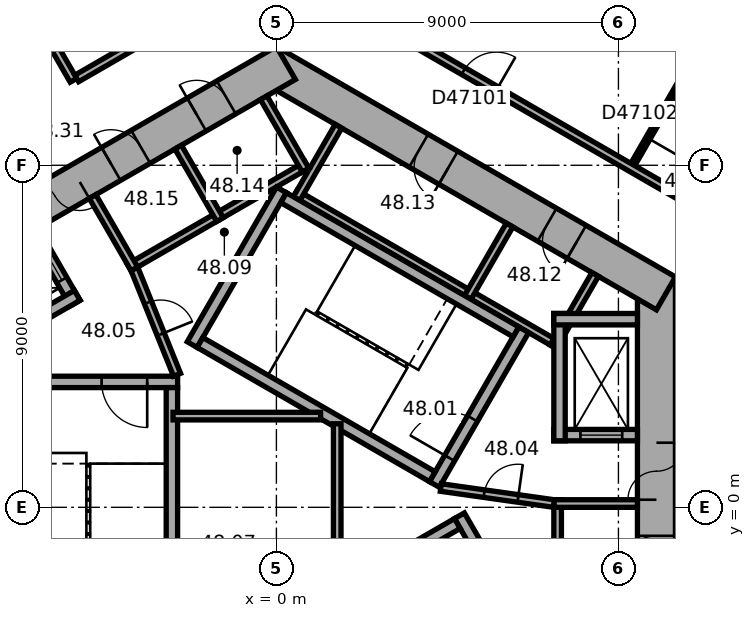
"""IFC4 building model, lengths in metres.
Left out: names, types, materials, properties, quantities, classifications, styles, units other than length and angle.
Written with IfcOpenShell. Run it as: python <this file> out.ifc"""

import sys

from ifc_helpers import new_model, si_unit, direction, frame, frame_2d, origin, place, context, subcontext, project, spatial, rectangle, extrude, element, fill, save


model = new_model("IFC4")
c1 = context("Model", 3, precision=1e-05, world=origin(), true_north=direction((0.0, 1.0)))
c2 = subcontext(c1, "Body", "Model", "MODEL_VIEW")
j1 = project(units=[si_unit("LENGTHUNIT", "METRE"), si_unit("PLANEANGLEUNIT", "RADIAN")], contexts=[c1])
p1 = place(None, origin())
s1 = spatial("IfcSite", under=j1, at=p1, CompositionType="ELEMENT")
p2 = place(p1, origin())
s2 = spatial("IfcBuilding", under=s1, at=p2, CompositionType="ELEMENT")
p3 = place(p2, frame((0.0, 0.0, 194.7)))
s3 = spatial("IfcBuildingStorey", under=s2, at=p3, CompositionType="ELEMENT", Elevation=194.7)
p4 = place(p3, frame((10.0, -6.062, 0.0), z_axis=(0.0, 0.0, 1.0), x_axis=(0.0, 1.0, 0.0)))
e1 = element("IfcWall", 1, at=p4, inside=s3, PredefinedType="SHEAR", context=c2, shape_type="SweptSolid", body=[
    extrude(rectangle(XDim=12.125, YDim=1.0, at=frame_2d((6.062, 0.0))), origin(), (0.0, 0.0, 1.0), 3.7),
])
p5 = place(p4, frame((6.262, 0.0, 0.0)))
e2 = element("IfcOpeningElement", 2, at=p5, cuts=e1, PredefinedType="OPENING", context=c2, shape_type="SweptSolid", body=[
    extrude(rectangle(XDim=1.5, YDim=2.1, at=frame_2d((0.75, 1.05))), frame((0.0, 0.51, 0.0), z_axis=(0.0, -1.0, 0.0), x_axis=(1.0, 0.0, 0.0)), (0.0, 0.0, 1.0), 1.02),
])
p6 = place(p4, frame((1.812, 0.0, 0.0)))
e3 = element("IfcOpeningElement", 3, at=p6, cuts=e1, PredefinedType="OPENING", context=c2, shape_type="SweptSolid", body=[
    extrude(rectangle(XDim=0.9, YDim=2.1, at=frame_2d((0.45, 1.05))), frame((0.0, 0.51, 0.0), z_axis=(0.0, -1.0, 0.0), x_axis=(1.0, 0.0, 0.0)), (0.0, 0.0, 1.0), 1.02),
])
p7 = place(p4, frame((4.412, 0.0, 0.0)))
e4 = element("IfcOpeningElement", 4, at=p7, cuts=e1, PredefinedType="OPENING", context=c2, shape_type="SweptSolid", body=[
    extrude(rectangle(XDim=0.9, YDim=2.1, at=frame_2d((0.45, 1.05))), frame((0.0, 0.51, 0.0), z_axis=(0.0, -1.0, 0.0), x_axis=(1.0, 0.0, 0.0)), (0.0, 0.0, 1.0), 1.02),
])
p8 = place(p3, frame((10.25, 5.629, 0.0), z_axis=(0.0, 0.0, 1.0), x_axis=(-0.866022616891, 0.50000482701, 0.0)))
e5 = element("IfcWall", 5, at=p8, inside=s3, PredefinedType="SHEAR", context=c2, shape_type="SweptSolid", body=[
    extrude(rectangle(XDim=12.125, YDim=1.0, at=frame_2d((6.062, 0.0))), origin(), (0.0, 0.0, 1.0), 3.7),
])
p9 = place(p8, frame((2.712, 0.0, 0.0)))
e6 = element("IfcOpeningElement", 6, at=p9, cuts=e5, PredefinedType="OPENING", context=c2, shape_type="SweptSolid", body=[
    extrude(rectangle(XDim=0.9, YDim=2.1, at=frame_2d((0.45, 1.05))), frame((0.0, 0.51, 0.0), z_axis=(0.0, -1.0, 0.0), x_axis=(1.0, 0.0, 0.0)), (0.0, 0.0, 1.0), 1.02),
])
p10 = place(p8, frame((6.612, 0.0, 0.0)))
e7 = element("IfcOpeningElement", 7, at=p10, cuts=e5, PredefinedType="OPENING", context=c2, shape_type="SweptSolid", body=[
    extrude(rectangle(XDim=0.9, YDim=2.1, at=frame_2d((0.45, 1.05))), frame((0.0, 0.51, 0.0), z_axis=(0.0, -1.0, 0.0), x_axis=(1.0, 0.0, 0.0)), (0.0, 0.0, 1.0), 1.02),
])
p11 = place(p3, frame((0.25, 11.691, 0.0), z_axis=(0.0, 0.0, 1.0), x_axis=(-0.866022616891, -0.50000482701, 0.0)))
e8 = element("IfcWall", 8, at=p11, inside=s3, PredefinedType="SHEAR", context=c2, shape_type="SweptSolid", body=[
    extrude(rectangle(XDim=12.125, YDim=1.0, at=frame_2d((6.062, 0.0))), origin(), (0.0, 0.0, 1.0), 3.7),
])
p12 = place(p11, frame((6.262, 0.0, 0.0)))
e9 = element("IfcOpeningElement", 9, at=p12, cuts=e8, PredefinedType="OPENING", context=c2, shape_type="SweptSolid", body=[
    extrude(rectangle(XDim=1.5, YDim=2.1, at=frame_2d((0.75, 1.05))), frame((0.0, 0.51, 0.0), z_axis=(0.0, -1.0, 0.0), x_axis=(1.0, 0.0, 0.0)), (0.0, 0.0, 1.0), 1.02),
])
p13 = place(p11, frame((1.812, 0.0, 0.0)))
e10 = element("IfcOpeningElement", 10, at=p13, cuts=e8, PredefinedType="OPENING", context=c2, shape_type="SweptSolid", body=[
    extrude(rectangle(XDim=0.9, YDim=2.1, at=frame_2d((0.45, 1.05))), frame((0.0, 0.51, 0.0), z_axis=(0.0, -1.0, 0.0), x_axis=(1.0, 0.0, 0.0)), (0.0, 0.0, 1.0), 1.02),
])
p14 = place(p11, frame((4.412, 0.0, 0.0)))
e11 = element("IfcOpeningElement", 11, at=p14, cuts=e8, PredefinedType="OPENING", context=c2, shape_type="SweptSolid", body=[
    extrude(rectangle(XDim=0.9, YDim=2.1, at=frame_2d((0.45, 1.05))), frame((0.0, 0.51, 0.0), z_axis=(0.0, -1.0, 0.0), x_axis=(1.0, 0.0, 0.0)), (0.0, 0.0, 1.0), 1.02),
])
p15 = place(p3, frame((7.4, -5.2, 0.0), z_axis=(0.0, 0.0, 1.0), x_axis=(0.0, 1.0, 0.0)))
e12 = element("IfcWall", 12, at=p15, inside=s3, PredefinedType="PARTITIONING", context=c2, shape_type="SweptSolid", body=[
    extrude(rectangle(XDim=5.4, YDim=0.2, at=frame_2d((2.7, 0.0))), origin(), (0.0, 0.0, 1.0), 3.42),
])
p16 = place(p3, frame((7.3, 0.1, 0.0), z_axis=(0.0, 0.0, 1.0), x_axis=(1.0, 0.0, 0.0)))
e13 = element("IfcWall", 13, at=p16, inside=s3, PredefinedType="PARTITIONING", context=c2, shape_type="SweptSolid", body=[
    extrude(rectangle(XDim=2.2, YDim=0.2, at=frame_2d((1.1, 0.0))), origin(), (0.0, 0.0, 1.0), 3.42),
])
p17 = place(p3, frame((7.424, 4.259, 0.0), z_axis=(0.0, 0.0, 1.0), x_axis=(-0.866026010844, 0.49999894854, 0.0)))
e14 = element("IfcWall", 14, at=p17, inside=s3, PredefinedType="PARTITIONING", context=c2, shape_type="SweptSolid", body=[
    extrude(rectangle(XDim=8.0, YDim=0.2, at=frame_2d((4.0, 0.0))), origin(), (0.0, 0.0, 1.0), 3.42),
])
for number, where, z_axis, x_axis in (
    (15, (7.287, 4.222, 0.0), (0.0, 0.0, 1.0), (0.5, 0.866, 0.0)),
    (16, (5.036, 5.522, 0.0), (0.0, 0.0, 1.0), (0.5, 0.866, 0.0)),
    (17, (0.532, 8.122, 0.0), (0.0, 0.0, 1.0), (0.5, 0.866, 0.0)),
):
    element("IfcWall", number, at=place(p3, frame(where, z_axis=z_axis, x_axis=x_axis)), inside=s3, PredefinedType="PARTITIONING", context=c2, shape_type="SweptSolid", body=[
        extrude(rectangle(XDim=2.2, YDim=0.2, at=frame_2d((1.1, 0.0))), origin(), (0.0, 0.0, 1.0), 3.42),
    ])
p18 = place(p3, frame((0.803, 9.009, 0.0), z_axis=(0.0, 0.0, 1.0), x_axis=(-0.866028230842, -0.499995103361, 0.0)))
e18 = element("IfcWall", 18, at=p18, inside=s3, PredefinedType="PARTITIONING", context=c2, shape_type="SweptSolid", body=[
    extrude(rectangle(XDim=5.4, YDim=0.2, at=frame_2d((2.7, 0.0))), origin(), (0.0, 0.0, 1.0), 3.42),
])
p19 = place(p3, frame((0.767, 8.872, 0.0), z_axis=(0.0, 0.0, 1.0), x_axis=(-0.499994660107, 0.866028486751, 0.0)))
e19 = element("IfcWall", 19, at=p19, inside=s3, PredefinedType="PARTITIONING", context=c2, shape_type="SweptSolid", body=[
    extrude(rectangle(XDim=2.2, YDim=0.2, at=frame_2d((1.1, 0.0))), origin(), (0.0, 0.0, 1.0), 3.42),
])
for number, where, z_axis, x_axis in (
    (20, (-1.485, 7.572, 0.0), (0.0, 0.0, 1.0), (-0.5, 0.866, 0.0)),
    (21, (-3.737, 6.272, 0.0), (0.0, 0.0, 1.0), (-0.5, 0.866, 0.0)),
):
    element("IfcWall", number, at=place(p3, frame(where, z_axis=z_axis, x_axis=x_axis)), inside=s3, PredefinedType="PARTITIONING", context=c2, shape_type="SweptSolid", body=[
        extrude(rectangle(XDim=2.2, YDim=0.2, at=frame_2d((1.1, 0.0))), origin(), (0.0, 0.0, 1.0), 3.42),
    ])
p20 = place(p3, frame((4.158, 0.602, 0.0), z_axis=(0.0, 0.0, 1.0), x_axis=(0.499977259774, 0.866038532462, 0.0)))
e22 = element("IfcWall", 22, at=p20, inside=s3, PredefinedType="SHEAR", context=c2, shape_type="SweptSolid", body=[
    extrude(rectangle(XDim=4.7, YDim=0.3, at=frame_2d((2.35, 0.0))), origin(), (0.0, 0.0, 1.0), 3.42),
])
p21 = place(p20, frame((0.8, 0.0, 0.0)))
e23 = element("IfcOpeningElement", 23, at=p21, cuts=e22, PredefinedType="OPENING", context=c2, shape_type="SweptSolid", body=[
    extrude(rectangle(XDim=1.2, YDim=2.1, at=frame_2d((0.6, 1.05))), frame((0.0, 0.16, 0.0), z_axis=(0.0, -1.0, 0.0), x_axis=(1.0, 0.0, 0.0)), (0.0, 0.0, 1.0), 0.32),
])
p22 = place(p3, frame((-2.216, 4.282, 0.0), z_axis=(0.0, 0.0, 1.0), x_axis=(0.499977259774, 0.866038532462, 0.0)))
e24 = element("IfcWall", 24, at=p22, inside=s3, PredefinedType="SHEAR", context=c2, shape_type="SweptSolid", body=[
    extrude(rectangle(XDim=4.7, YDim=0.3, at=frame_2d((2.35, 0.0))), origin(), (0.0, 0.0, 1.0), 3.42),
])
for number, where, z_axis, x_axis in (
    (25, (4.103, 0.807, 0.0), (0.0, 0.0, 1.0), (-0.866, 0.5, 0.0)),
    (26, (6.303, 4.617, 0.0), (0.0, 0.0, 1.0), (-0.866, 0.5, 0.0)),
):
    element("IfcWall", number, at=place(p3, frame(where, z_axis=z_axis, x_axis=x_axis)), inside=s3, PredefinedType="SHEAR", context=c2, shape_type="SweptSolid", body=[
        extrude(rectangle(XDim=7.06, YDim=0.3, at=frame_2d((3.53, 0.0))), origin(), (0.0, 0.0, 1.0), 3.42),
    ])
p23 = place(p3, frame((-2.6, 3.3, 0.0), z_axis=(0.0, 0.0, 1.0), x_axis=(-1.0, 0.0, 0.0)))
e27 = element("IfcWall", 27, at=p23, inside=s3, PredefinedType="SHEAR", context=c2, shape_type="SweptSolid", body=[
    extrude(rectangle(XDim=4.7, YDim=0.3, at=frame_2d((2.35, 0.0))), origin(), (0.0, 0.0, 1.0), 3.42),
])
p24 = place(p23, frame((0.8, 0.0, 0.0)))
e28 = element("IfcOpeningElement", 28, at=p24, cuts=e27, PredefinedType="OPENING", context=c2, shape_type="SweptSolid", body=[
    extrude(rectangle(XDim=1.2, YDim=2.1, at=frame_2d((0.6, 1.05))), frame((0.0, 0.16, 0.0), z_axis=(0.0, -1.0, 0.0), x_axis=(1.0, 0.0, 0.0)), (0.0, 0.0, 1.0), 0.32),
])
p25 = place(p3, frame((-2.75, 3.15, 0.0), z_axis=(0.0, 0.0, 1.0), x_axis=(0.0, -1.0, 0.0)))
e29 = element("IfcWall", 29, at=p25, inside=s3, PredefinedType="SHEAR", context=c2, shape_type="SweptSolid", body=[
    extrude(rectangle(XDim=7.06, YDim=0.3, at=frame_2d((3.53, 0.0))), origin(), (0.0, 0.0, 1.0), 3.42),
])
p26 = place(p3, frame((4.816, -0.222, 0.0), z_axis=(0.0, 0.0, 1.0), x_axis=(0.499977259774, -0.866038532462, 0.0)))
e30 = element("IfcWall", 30, at=p26, inside=s3, PredefinedType="SHEAR", context=c2, shape_type="SweptSolid", body=[
    extrude(rectangle(XDim=4.7, YDim=0.3, at=frame_2d((2.35, 0.0))), origin(), (0.0, 0.0, 1.0), 3.42),
])
p27 = place(p3, frame((-1.353, -3.957, 0.0), z_axis=(0.0, 0.0, 1.0), x_axis=(0.866027801685, 0.499995846692, 0.0)))
e31 = element("IfcWall", 31, at=p27, inside=s3, PredefinedType="SHEAR", context=c2, shape_type="SweptSolid", body=[
    extrude(rectangle(XDim=7.06, YDim=0.3, at=frame_2d((3.53, 0.0))), origin(), (0.0, 0.0, 1.0), 3.42),
])
p28 = place(p3, frame((7.3, 1.9, 0.0), z_axis=(0.0, 0.0, 1.0), x_axis=(1.0, 0.0, 0.0)))
e32 = element("IfcWall", 32, at=p28, inside=s3, PredefinedType="SHEAR", context=c2, shape_type="SweptSolid", body=[
    extrude(rectangle(XDim=2.2, YDim=0.3, at=frame_2d((1.1, 0.0))), origin(), (0.0, 0.0, 1.0), 3.42),
])
p29 = place(p28, frame((0.7, 0.0, 0.0)))
e33 = element("IfcOpeningElement", 33, at=p29, cuts=e32, PredefinedType="OPENING", context=c2, shape_type="SweptSolid", body=[
    extrude(rectangle(XDim=1.1, YDim=2.1, at=frame_2d((0.55, 1.05))), frame((0.0, 0.16, 0.0), z_axis=(0.0, -1.0, 0.0), x_axis=(1.0, 0.0, 0.0)), (0.0, 0.0, 1.0), 0.32),
])
p30 = place(p3, frame((7.45, 1.75, 0.0), z_axis=(0.0, 0.0, 1.0), x_axis=(0.0, 1.0, 0.0)))
e34 = element("IfcWall", 34, at=p30, inside=s3, PredefinedType="SHEAR", context=c2, shape_type="SweptSolid", body=[
    extrude(rectangle(XDim=3.35, YDim=0.3, at=frame_2d((1.675, 0.0))), origin(), (0.0, 0.0, 1.0), 3.42),
])
p31 = place(p3, frame((7.3, 4.95, 0.0), z_axis=(0.0, 0.0, 1.0), x_axis=(1.0, 0.0, 0.0)))
e35 = element("IfcWall", 35, at=p31, inside=s3, PredefinedType="SHEAR", context=c2, shape_type="SweptSolid", body=[
    extrude(rectangle(XDim=2.2, YDim=0.3, at=frame_2d((1.1, 0.0))), origin(), (0.0, 0.0, 1.0), 3.42),
])
p32 = place(p3, frame((4.327, 0.521, 0.0), z_axis=(0.0, 0.0, 1.0), x_axis=(0.990124376366, -0.14019172346, 0.0)))
e36 = element("IfcWall", 36, at=p32, inside=s3, PredefinedType="PARTITIONING", context=c2, shape_type="SweptSolid", body=[
    extrude(rectangle(XDim=3.002, YDim=0.2, at=frame_2d((1.501, 0.0))), origin(), (0.0, 0.0, 1.0), 3.42),
])
p33 = place(p32, frame((1.15, 0.0, 0.0)))
e37 = element("IfcOpeningElement", 37, at=p33, cuts=e36, PredefinedType="OPENING", context=c2, shape_type="SweptSolid", body=[
    extrude(rectangle(XDim=0.9, YDim=2.1, at=frame_2d((0.45, 1.05))), frame((0.0, 0.11, 0.0), z_axis=(0.0, -1.0, 0.0), x_axis=(1.0, 0.0, 0.0)), (0.0, 0.0, 1.0), 0.22),
])
p34 = place(p3, frame((-5.295, 5.372, 0.0), z_axis=(0.0, 0.0, 1.0), x_axis=(-0.500077893725, 0.86598042715, 0.0)))
e38 = element("IfcWall", 38, at=p34, inside=s3, PredefinedType="SHEAR", context=c2, shape_type="SweptSolid", body=[
    extrude(rectangle(XDim=2.2, YDim=0.3, at=frame_2d((1.1, 0.0))), origin(), (0.0, 0.0, 1.0), 3.42),
])
p35 = place(p34, frame((0.7, 0.0, 0.0)))
e39 = element("IfcOpeningElement", 39, at=p35, cuts=e38, PredefinedType="OPENING", context=c2, shape_type="SweptSolid", body=[
    extrude(rectangle(XDim=1.1, YDim=2.1, at=frame_2d((0.55, 1.05))), frame((0.0, 0.16, 0.0), z_axis=(0.0, -1.0, 0.0), x_axis=(1.0, 0.0, 0.0)), (0.0, 0.0, 1.0), 0.32),
])
p36 = place(p3, frame((-5.24, 5.577, 0.0), z_axis=(0.0, 0.0, 1.0), x_axis=(-0.866014461049, -0.500018952895, 0.0)))
e40 = element("IfcWall", 40, at=p36, inside=s3, PredefinedType="SHEAR", context=c2, shape_type="SweptSolid", body=[
    extrude(rectangle(XDim=3.35, YDim=0.3, at=frame_2d((1.675, 0.0))), origin(), (0.0, 0.0, 1.0), 3.42),
])
p37 = place(p3, frame((-2.615, 3.487, 0.0), z_axis=(0.0, 0.0, 1.0), x_axis=(-0.373576831041, 0.92759924068, 0.0)))
e41 = element("IfcWall", 41, at=p37, inside=s3, PredefinedType="PARTITIONING", context=c2, shape_type="SweptSolid", body=[
    extrude(rectangle(XDim=3.002, YDim=0.2, at=frame_2d((1.501, 0.0))), origin(), (0.0, 0.0, 1.0), 3.42),
])
p38 = place(p37, frame((1.15, 0.0, 0.0)))
e42 = element("IfcOpeningElement", 42, at=p38, cuts=e41, PredefinedType="OPENING", context=c2, shape_type="SweptSolid", body=[
    extrude(rectangle(XDim=0.9, YDim=2.1, at=frame_2d((0.45, 1.05))), frame((0.0, 0.11, 0.0), z_axis=(0.0, -1.0, 0.0), x_axis=(1.0, 0.0, 0.0)), (0.0, 0.0, 1.0), 0.22),
])
p39 = place(p3, frame((-2.72, 2.4, 0.0), z_axis=(0.0, 0.0, 1.0), x_axis=(1.0, 0.0, 0.0)))
e43 = element("IfcWall", 43, at=p39, inside=s3, PredefinedType="PARTITIONING", context=c2, shape_type="SweptSolid", body=[
    extrude(rectangle(XDim=3.883, YDim=0.2, at=frame_2d((1.941, 0.0))), origin(), (0.0, 0.0, 1.0), 3.42),
])
p40 = place(p3, frame((1.6, -2.198, 0.0), z_axis=(0.0, 0.0, 1.0), x_axis=(0.0, 1.0, 0.0)))
e44 = element("IfcWall", 44, at=p40, inside=s3, PredefinedType="PARTITIONING", context=c2, shape_type="SweptSolid", body=[
    extrude(rectangle(XDim=4.397, YDim=0.2, at=frame_2d((2.198, 0.0))), origin(), (0.0, 0.0, 1.0), 3.42),
])
p41 = place(p3, frame((-9.515, 18.466, 0.0), z_axis=(0.0, 0.0, 1.0), x_axis=(0.500010139422, -0.866019549707, 0.0)))
e45 = element("IfcWall", 45, at=p41, inside=s3, PredefinedType="PARTITIONING", context=c2, shape_type="SweptSolid", body=[
    extrude(rectangle(XDim=8.35, YDim=0.2, at=frame_2d((4.175, 0.0))), origin(), (0.0, 0.0, 1.0), 2.87),
])
p42 = place(p41, frame((3.675, 0.0, 0.0)))
e46 = element("IfcOpeningElement", 46, at=p42, cuts=e45, PredefinedType="OPENING", context=c2, shape_type="SweptSolid", body=[
    extrude(rectangle(XDim=1.0, YDim=2.1, at=frame_2d((0.5, 1.05))), frame((0.0, 0.11, 0.0), z_axis=(0.0, -1.0, 0.0), x_axis=(1.0, 0.0, 0.0)), (0.0, 0.0, 1.0), 0.22),
])
p43 = place(p3, frame((-0.95, 13.77, 0.0), z_axis=(0.0, 0.0, 1.0), x_axis=(-0.866036689987, -0.499980451214, 0.0)))
e47 = element("IfcWall", 47, at=p43, inside=s3, PredefinedType="PARTITIONING", context=c2, shape_type="SweptSolid", body=[
    extrude(rectangle(XDim=4.969, YDim=0.2, at=frame_2d((2.485, 0.0))), origin(), (0.0, 0.0, 1.0), 3.42),
])
p44 = place(p3, frame((9.378, 9.019, 0.0), z_axis=(0.0, 0.0, 1.0), x_axis=(0.500004234368, 0.866022959057, 0.0)))
e48 = element("IfcWall", 48, at=p44, inside=s3, PredefinedType="PARTITIONING", context=c2, shape_type="SweptSolid", body=[
    extrude(rectangle(XDim=2.5, YDim=0.12, at=frame_2d((1.25, 0.0))), origin(), (0.0, 0.0, 1.0), 3.42),
])
p45 = place(p44, frame((0.8, 0.0, 0.0)))
e49 = element("IfcOpeningElement", 49, at=p45, cuts=e48, PredefinedType="OPENING", context=c2, shape_type="SweptSolid", body=[
    extrude(rectangle(XDim=0.9, YDim=2.1, at=frame_2d((0.45, 1.05))), frame((0.0, 0.07, 0.0), z_axis=(0.0, -1.0, 0.0), x_axis=(1.0, 0.0, 0.0)), (0.0, 0.0, 1.0), 0.14),
])
p46 = place(p3, frame((11.233, 7.833, 0.0), z_axis=(0.0, 0.0, 1.0), x_axis=(-0.866021713988, 0.50000639086, 0.0)))
e50 = element("IfcWall", 50, at=p46, inside=s3, PredefinedType="PARTITIONING", context=c2, shape_type="SweptSolid", body=[
    extrude(rectangle(XDim=11.834, YDim=0.2, at=frame_2d((5.917, 0.0))), origin(), (0.0, 0.0, 1.0), 3.42),
])
p47 = place(p46, frame((6.288, 0.0, 0.0)))
e51 = element("IfcOpeningElement", 51, at=p47, cuts=e50, PredefinedType="OPENING", context=c2, shape_type="SweptSolid", body=[
    extrude(rectangle(XDim=1.0, YDim=2.1, at=frame_2d((0.5, 1.05))), frame((0.0, 0.11, 0.0), z_axis=(0.0, -1.0, 0.0), x_axis=(1.0, 0.0, 0.0)), (0.0, 0.0, 1.0), 0.22),
])
p48 = place(p5, origin())
e52 = element("IfcDoor", 52, at=p48, inside=s3, OperationType="DOUBLE_DOOR_SINGLE_SWING", PredefinedType="DOOR", context=c2, shape_type="SweptSolid", body=[
    extrude(rectangle(XDim=1.5, YDim=2.1, at=frame_2d((0.75, 1.05))), frame((0.0, 0.025, 0.0), z_axis=(0.0, -1.0, 0.0), x_axis=(1.0, 0.0, 0.0)), (0.0, 0.0, 1.0), 0.05),
])
fill(e2, e52)
p49 = place(p12, origin())
e53 = element("IfcDoor", 53, at=p49, inside=s3, OperationType="DOUBLE_DOOR_SINGLE_SWING", PredefinedType="DOOR", context=c2, shape_type="SweptSolid", body=[
    extrude(rectangle(XDim=1.5, YDim=2.1, at=frame_2d((0.75, 1.05))), frame((0.0, 0.025, 0.0), z_axis=(0.0, -1.0, 0.0), x_axis=(1.0, 0.0, 0.0)), (0.0, 0.0, 1.0), 0.05),
])
fill(e9, e53)
p50 = place(p21, origin())
e54 = element("IfcDoor", 54, at=p50, inside=s3, OperationType="SINGLE_SWING_RIGHT", PredefinedType="DOOR", context=c2, shape_type="SweptSolid", body=[
    extrude(rectangle(XDim=1.2, YDim=2.1, at=frame_2d((0.6, 1.05))), frame((0.0, 0.025, 0.0), z_axis=(0.0, -1.0, 0.0), x_axis=(1.0, 0.0, 0.0)), (0.0, 0.0, 1.0), 0.05),
])
fill(e23, e54)
p51 = place(p24, origin())
e55 = element("IfcDoor", 55, at=p51, inside=s3, OperationType="SINGLE_SWING_RIGHT", PredefinedType="DOOR", context=c2, shape_type="SweptSolid", body=[
    extrude(rectangle(XDim=1.2, YDim=2.1, at=frame_2d((0.6, 1.05))), frame((0.0, 0.025, 0.0), z_axis=(0.0, -1.0, 0.0), x_axis=(1.0, 0.0, 0.0)), (0.0, 0.0, 1.0), 0.05),
])
fill(e28, e55)
p52 = place(p33, origin())
e56 = element("IfcDoor", 56, at=p52, inside=s3, OperationType="SINGLE_SWING_LEFT", PredefinedType="DOOR", context=c2, shape_type="SweptSolid", body=[
    extrude(rectangle(XDim=0.9, YDim=2.1, at=frame_2d((0.45, 1.05))), frame((0.0, 0.025, 0.0), z_axis=(0.0, -1.0, 0.0), x_axis=(1.0, 0.0, 0.0)), (0.0, 0.0, 1.0), 0.05),
])
fill(e37, e56)
p53 = place(p38, origin())
e57 = element("IfcDoor", 57, at=p53, inside=s3, OperationType="SINGLE_SWING_LEFT", PredefinedType="DOOR", context=c2, shape_type="SweptSolid", body=[
    extrude(rectangle(XDim=0.9, YDim=2.1, at=frame_2d((0.45, 1.05))), frame((0.0, 0.025, 0.0), z_axis=(0.0, -1.0, 0.0), x_axis=(1.0, 0.0, 0.0)), (0.0, 0.0, 1.0), 0.05),
])
fill(e42, e57)
p54 = place(p7, origin())
e58 = element("IfcDoor", 58, at=p54, inside=s3, OperationType="SINGLE_SWING_LEFT", PredefinedType="DOOR", context=c2, shape_type="SweptSolid", body=[
    extrude(rectangle(XDim=0.9, YDim=2.1, at=frame_2d((0.45, 1.05))), frame((0.0, 0.025, 0.0), z_axis=(0.0, -1.0, 0.0), x_axis=(1.0, 0.0, 0.0)), (0.0, 0.0, 1.0), 0.05),
])
fill(e4, e58)
p55 = place(p9, origin())
e59 = element("IfcDoor", 59, at=p55, inside=s3, OperationType="SINGLE_SWING_LEFT", PredefinedType="DOOR", context=c2, shape_type="SweptSolid", body=[
    extrude(rectangle(XDim=0.9, YDim=2.1, at=frame_2d((0.45, 1.05))), frame((0.0, 0.025, 0.0), z_axis=(0.0, -1.0, 0.0), x_axis=(1.0, 0.0, 0.0)), (0.0, 0.0, 1.0), 0.05),
])
fill(e6, e59)
p56 = place(p10, origin())
e60 = element("IfcDoor", 60, at=p56, inside=s3, OperationType="SINGLE_SWING_LEFT", PredefinedType="DOOR", context=c2, shape_type="SweptSolid", body=[
    extrude(rectangle(XDim=0.9, YDim=2.1, at=frame_2d((0.45, 1.05))), frame((0.0, 0.025, 0.0), z_axis=(0.0, -1.0, 0.0), x_axis=(1.0, 0.0, 0.0)), (0.0, 0.0, 1.0), 0.05),
])
fill(e7, e60)
p57 = place(p13, origin())
e61 = element("IfcDoor", 61, at=p57, inside=s3, OperationType="SINGLE_SWING_LEFT", PredefinedType="DOOR", context=c2, shape_type="SweptSolid", body=[
    extrude(rectangle(XDim=0.9, YDim=2.1, at=frame_2d((0.45, 1.05))), frame((0.0, 0.025, 0.0), z_axis=(0.0, -1.0, 0.0), x_axis=(1.0, 0.0, 0.0)), (0.0, 0.0, 1.0), 0.05),
])
fill(e10, e61)
p58 = place(p14, origin())
e62 = element("IfcDoor", 62, at=p58, inside=s3, OperationType="SINGLE_SWING_LEFT", PredefinedType="DOOR", context=c2, shape_type="SweptSolid", body=[
    extrude(rectangle(XDim=0.9, YDim=2.1, at=frame_2d((0.45, 1.05))), frame((0.0, 0.025, 0.0), z_axis=(0.0, -1.0, 0.0), x_axis=(1.0, 0.0, 0.0)), (0.0, 0.0, 1.0), 0.05),
])
fill(e11, e62)
p59 = place(p29, origin())
e63 = element("IfcDoor", 63, at=p59, inside=s3, OperationType="DOUBLE_DOOR_SLIDING", PredefinedType="DOOR", context=c2, shape_type="SweptSolid", body=[
    extrude(rectangle(XDim=1.1, YDim=2.1, at=frame_2d((0.55, 1.05))), frame((0.0, 0.025, 0.0), z_axis=(0.0, -1.0, 0.0), x_axis=(1.0, 0.0, 0.0)), (0.0, 0.0, 1.0), 0.05),
])
fill(e33, e63)
p60 = place(p35, origin())
e64 = element("IfcDoor", 64, at=p60, inside=s3, OperationType="DOUBLE_DOOR_SLIDING", PredefinedType="DOOR", context=c2, shape_type="SweptSolid", body=[
    extrude(rectangle(XDim=1.1, YDim=2.1, at=frame_2d((0.55, 1.05))), frame((0.0, 0.025, 0.0), z_axis=(0.0, -1.0, 0.0), x_axis=(1.0, 0.0, 0.0)), (0.0, 0.0, 1.0), 0.05),
])
fill(e39, e64)
p61 = place(p47, origin())
e65 = element("IfcDoor", 65, at=p61, inside=s3, OperationType="SINGLE_SWING_LEFT", PredefinedType="DOOR", context=c2, shape_type="SweptSolid", body=[
    extrude(rectangle(XDim=1.0, YDim=2.1, at=frame_2d((0.5, 1.05))), frame((0.0, 0.025, 0.0), z_axis=(0.0, -1.0, 0.0), x_axis=(1.0, 0.0, 0.0)), (0.0, 0.0, 1.0), 0.05),
])
fill(e51, e65)
p62 = place(p45, origin())
e66 = element("IfcDoor", 66, at=p62, inside=s3, OperationType="SINGLE_SWING_LEFT", PredefinedType="DOOR", context=c2, shape_type="SweptSolid", body=[
    extrude(rectangle(XDim=0.9, YDim=2.1, at=frame_2d((0.45, 1.05))), frame((0.0, 0.025, 0.0), z_axis=(0.0, -1.0, 0.0), x_axis=(1.0, 0.0, 0.0)), (0.0, 0.0, 1.0), 0.05),
])
fill(e49, e66)
save(model, sys.argv[1])
